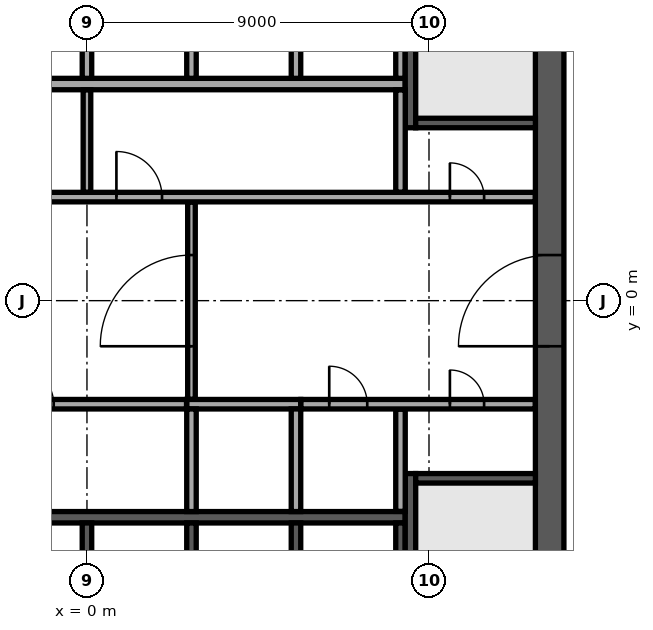
"""IFC4 building model, lengths in metres.
Left out: names, types, materials, properties, quantities, classifications, styles, units other than length and angle.
Written with IfcOpenShell. Run it as: python <this file> out.ifc"""

import sys

from ifc_helpers import new_model, si_unit, direction, frame, frame_2d, origin, place, context, subcontext, project, spatial, rectangle, extrude, element, fill, save


model = new_model("IFC4")
c1 = context("Model", 3, precision=1e-05, world=origin(), true_north=direction((0.0, 1.0)))
c2 = subcontext(c1, "Body", "Model", "MODEL_VIEW")
j1 = project(units=[si_unit("LENGTHUNIT", "METRE"), si_unit("PLANEANGLEUNIT", "RADIAN")], contexts=[c1])
p1 = place(None, origin())
s1 = spatial("IfcSite", under=j1, at=p1, CompositionType="ELEMENT")
p2 = place(p1, origin())
s2 = spatial("IfcBuilding", under=s1, at=p2, CompositionType="ELEMENT")
p3 = place(p2, frame((0.0, 0.0, 246.9)))
s3 = spatial("IfcBuildingStorey", under=s2, at=p3, CompositionType="ELEMENT", Elevation=246.9)
p4 = place(p3, frame((12.175, -11.8, 0.0), z_axis=(0.0, 0.0, 1.0), x_axis=(0.0, 1.0, 0.0)))
e1 = element("IfcWall", 1, at=p4, inside=s3, PredefinedType="SHEAR", context=c2, shape_type="SweptSolid", body=[
    extrude(rectangle(XDim=23.6, YDim=0.75, at=frame_2d((11.8, 0.0))), origin(), (0.0, 0.0, 1.0), 3.64),
])
p5 = place(p4, frame((10.6, 0.0, 0.0)))
e2 = element("IfcOpeningElement", 2, at=p5, cuts=e1, PredefinedType="OPENING", context=c2, shape_type="SweptSolid", body=[
    extrude(rectangle(XDim=2.4, YDim=2.4, at=frame_2d((1.2, 1.2))), frame((0.0, 0.385, 0.0), z_axis=(0.0, -1.0, 0.0), x_axis=(1.0, 0.0, 0.0)), (0.0, 0.0, 1.0), 0.77),
])
p6 = place(p3, frame((-8.375, 5.7, 0.0), z_axis=(0.0, 0.0, 1.0), x_axis=(1.0, 0.0, 0.0)))
e3 = element("IfcWall", 3, at=p6, inside=s3, PredefinedType="SOLIDWALL", context=c2, shape_type="SweptSolid", body=[
    extrude(rectangle(XDim=16.75, YDim=0.3, at=frame_2d((8.375, 0.0))), origin(), (0.0, 0.0, 1.0), 3.64),
])
p7 = place(p3, frame((-2.875, -5.7, 0.0), z_axis=(0.0, 0.0, 1.0), x_axis=(1.0, 0.0, 0.0)))
e4 = element("IfcWall", 4, at=p7, inside=s3, PredefinedType="SOLIDWALL", context=c2, shape_type="SweptSolid", body=[
    extrude(rectangle(XDim=11.25, YDim=0.3, at=frame_2d((5.625, 0.0))), origin(), (0.0, 0.0, 1.0), 3.64),
])
for number, where, z_axis, x_axis in (
    (5, (0.0, 5.85, 0.0), (0.0, 0.0, 1.0), (0.0, 1.0, 0.0)),
    (6, (2.75, 5.85, 0.0), (0.0, 0.0, 1.0), (0.0, 1.0, 0.0)),
    (7, (5.5, 5.85, 0.0), (0.0, 0.0, 1.0), (0.0, 1.0, 0.0)),
    (8, (8.25, 5.85, 0.0), (0.0, 0.0, 1.0), (0.0, 1.0, 0.0)),
):
    element("IfcWall", number, at=place(p3, frame(where, z_axis=z_axis, x_axis=x_axis)), inside=s3, PredefinedType="SOLIDWALL", context=c2, shape_type="SweptSolid", body=[
        extrude(rectangle(XDim=2.7, YDim=0.25, at=frame_2d((1.35, 0.0))), origin(), (0.0, 0.0, 1.0), 3.64),
    ])
p8 = place(p3, frame((2.625, -2.725, 0.0), z_axis=(0.0, 0.0, 1.0), x_axis=(1.0, 0.0, 0.0)))
e9 = element("IfcWall", 9, at=p8, inside=s3, PredefinedType="SOLIDWALL", context=c2, shape_type="SweptSolid", body=[
    extrude(rectangle(XDim=3.0, YDim=0.25, at=frame_2d((1.5, 0.0))), origin(), (0.0, 0.0, 1.0), 3.64),
])
for number, where, z_axis, x_axis in (
    (10, (2.75, -5.55, 0.0), (0.0, 0.0, 1.0), (0.0, 1.0, 0.0)),
    (11, (5.5, -5.55, 0.0), (0.0, 0.0, 1.0), (0.0, 1.0, 0.0)),
    (12, (0.0, -8.55, 0.0), (0.0, 0.0, 1.0), (0.0, 1.0, 0.0)),
    (13, (2.75, -8.55, 0.0), (0.0, 0.0, 1.0), (0.0, 1.0, 0.0)),
    (14, (5.5, -8.55, 0.0), (0.0, 0.0, 1.0), (0.0, 1.0, 0.0)),
    (15, (8.25, -8.55, 0.0), (0.0, 0.0, 1.0), (0.0, 1.0, 0.0)),
):
    element("IfcWall", number, at=place(p3, frame(where, z_axis=z_axis, x_axis=x_axis)), inside=s3, PredefinedType="SOLIDWALL", context=c2, shape_type="SweptSolid", body=[
        extrude(rectangle(XDim=2.7, YDim=0.25, at=frame_2d((1.35, 0.0))), origin(), (0.0, 0.0, 1.0), 3.64),
    ])
p9 = place(p3, frame((8.512, 4.55, 0.0), z_axis=(0.0, 0.0, 1.0), x_axis=(0.0, 1.0, 0.0)))
e16 = element("IfcWall", 16, at=p9, inside=s3, PredefinedType="SOLIDWALL", context=c2, shape_type="SweptSolid", body=[
    extrude(rectangle(XDim=7.25, YDim=0.275, at=frame_2d((3.625, 0.0))), origin(), (0.0, 0.0, 1.0), 3.64),
])
p10 = place(p9, frame((6.0, 0.0, 0.0)))
e17 = element("IfcOpeningElement", 17, at=p10, cuts=e16, PredefinedType="OPENING", context=c2, shape_type="SweptSolid", body=[
    extrude(rectangle(XDim=1.0, YDim=2.1, at=frame_2d((0.5, 1.05))), frame((0.0, 0.147, 0.0), z_axis=(0.0, -1.0, 0.0), x_axis=(1.0, 0.0, 0.0)), (0.0, 0.0, 1.0), 0.295),
])
p11 = place(p3, frame((8.65, 4.675, 0.0), z_axis=(0.0, 0.0, 1.0), x_axis=(1.0, 0.0, 0.0)))
e18 = element("IfcWall", 18, at=p11, inside=s3, PredefinedType="SOLIDWALL", context=c2, shape_type="SweptSolid", body=[
    extrude(rectangle(XDim=3.15, YDim=0.25, at=frame_2d((1.575, 0.0))), origin(), (0.0, 0.0, 1.0), 3.64),
])
p12 = place(p3, frame((8.512, -4.55, 0.0), z_axis=(0.0, 0.0, 1.0), x_axis=(0.0, -1.0, 0.0)))
e19 = element("IfcWall", 19, at=p12, inside=s3, PredefinedType="SOLIDWALL", context=c2, shape_type="SweptSolid", body=[
    extrude(rectangle(XDim=7.25, YDim=0.275, at=frame_2d((3.625, 0.0))), origin(), (0.0, 0.0, 1.0), 3.64),
])
p13 = place(p12, frame((6.0, 0.0, 0.0)))
e20 = element("IfcOpeningElement", 20, at=p13, cuts=e19, PredefinedType="OPENING", context=c2, shape_type="SweptSolid", body=[
    extrude(rectangle(XDim=1.0, YDim=2.1, at=frame_2d((0.5, 1.05))), frame((0.0, 0.147, 0.0), z_axis=(0.0, -1.0, 0.0), x_axis=(1.0, 0.0, 0.0)), (0.0, 0.0, 1.0), 0.295),
])
p14 = place(p3, frame((8.65, -4.675, 0.0), z_axis=(0.0, 0.0, 1.0), x_axis=(1.0, 0.0, 0.0)))
e21 = element("IfcWall", 21, at=p14, inside=s3, PredefinedType="SOLIDWALL", context=c2, shape_type="SweptSolid", body=[
    extrude(rectangle(XDim=3.15, YDim=0.25, at=frame_2d((1.575, 0.0))), origin(), (0.0, 0.0, 1.0), 3.64),
])
p15 = place(p3, frame((8.25, -5.545, 0.0), z_axis=(0.0, 0.0, 1.0), x_axis=(0.0, 1.0, 0.0)))
e22 = element("IfcWall", 22, at=p15, inside=s3, PredefinedType="PARTITIONING", context=c2, shape_type="SweptSolid", body=[
    extrude(rectangle(XDim=2.69, YDim=0.25, at=frame_2d((1.345, 0.0))), origin(), (0.0, 0.0, 1.0), 3.64),
])
p16 = place(p3, frame((-11.795, -2.725, 0.0), z_axis=(0.0, 0.0, 1.0), x_axis=(1.0, 0.0, 0.0)))
e23 = element("IfcWall", 23, at=p16, inside=s3, PredefinedType="PARTITIONING", context=c2, shape_type="SweptSolid", body=[
    extrude(rectangle(XDim=14.415, YDim=0.25, at=frame_2d((7.208, 0.0))), origin(), (0.0, 0.0, 1.0), 3.64),
])
p17 = place(p16, frame((1.295, 0.0, 0.0)))
e24 = element("IfcOpeningElement", 24, at=p17, cuts=e23, PredefinedType="OPENING", context=c2, shape_type="SweptSolid", body=[
    extrude(rectangle(XDim=1.0, YDim=2.1, at=frame_2d((0.5, 1.05))), frame((0.0, 0.135, 0.0), z_axis=(0.0, -1.0, 0.0), x_axis=(1.0, 0.0, 0.0)), (0.0, 0.0, 1.0), 0.27),
])
p18 = place(p16, frame((4.42, 0.0, 0.0)))
e25 = element("IfcOpeningElement", 25, at=p18, cuts=e23, PredefinedType="OPENING", context=c2, shape_type="SweptSolid", body=[
    extrude(rectangle(XDim=1.0, YDim=2.1, at=frame_2d((0.5, 1.05))), frame((0.0, 0.135, 0.0), z_axis=(0.0, -1.0, 0.0), x_axis=(1.0, 0.0, 0.0)), (0.0, 0.0, 1.0), 0.27),
])
p19 = place(p16, frame((9.92, 0.0, 0.0)))
e26 = element("IfcOpeningElement", 26, at=p19, cuts=e23, PredefinedType="OPENING", context=c2, shape_type="SweptSolid", body=[
    extrude(rectangle(XDim=1.0, YDim=2.1, at=frame_2d((0.5, 1.05))), frame((0.0, 0.135, 0.0), z_axis=(0.0, -1.0, 0.0), x_axis=(1.0, 0.0, 0.0)), (0.0, 0.0, 1.0), 0.27),
])
p20 = place(p3, frame((5.63, -2.725, 0.0), z_axis=(0.0, 0.0, 1.0), x_axis=(1.0, 0.0, 0.0)))
e27 = element("IfcWall", 27, at=p20, inside=s3, PredefinedType="PARTITIONING", context=c2, shape_type="SweptSolid", body=[
    extrude(rectangle(XDim=6.165, YDim=0.25, at=frame_2d((3.083, 0.0))), origin(), (0.0, 0.0, 1.0), 3.64),
])
p21 = place(p20, frame((0.745, 0.0, 0.0)))
e28 = element("IfcOpeningElement", 28, at=p21, cuts=e27, PredefinedType="OPENING", context=c2, shape_type="SweptSolid", body=[
    extrude(rectangle(XDim=1.0, YDim=2.1, at=frame_2d((0.5, 1.05))), frame((0.0, 0.135, 0.0), z_axis=(0.0, -1.0, 0.0), x_axis=(1.0, 0.0, 0.0)), (0.0, 0.0, 1.0), 0.27),
])
p22 = place(p20, frame((3.92, 0.0, 0.0)))
e29 = element("IfcOpeningElement", 29, at=p22, cuts=e27, PredefinedType="OPENING", context=c2, shape_type="SweptSolid", body=[
    extrude(rectangle(XDim=0.9, YDim=2.1, at=frame_2d((0.45, 1.05))), frame((0.0, 0.135, 0.0), z_axis=(0.0, -1.0, 0.0), x_axis=(1.0, 0.0, 0.0)), (0.0, 0.0, 1.0), 0.27),
])
p23 = place(p3, frame((2.75, -2.595, 0.0), z_axis=(0.0, 0.0, 1.0), x_axis=(0.0, 1.0, 0.0)))
e30 = element("IfcWall", 30, at=p23, inside=s3, PredefinedType="PARTITIONING", context=c2, shape_type="SweptSolid", body=[
    extrude(rectangle(XDim=5.19, YDim=0.2, at=frame_2d((2.595, 0.0))), origin(), (0.0, 0.0, 1.0), 3.64),
])
p24 = place(p23, frame((1.395, 0.0, 0.0)))
e31 = element("IfcOpeningElement", 31, at=p24, cuts=e30, PredefinedType="OPENING", context=c2, shape_type="SweptSolid", body=[
    extrude(rectangle(XDim=2.4, YDim=2.4, at=frame_2d((1.2, 1.2))), frame((0.0, 0.11, 0.0), z_axis=(0.0, -1.0, 0.0), x_axis=(1.0, 0.0, 0.0)), (0.0, 0.0, 1.0), 0.22),
])
p25 = place(p3, frame((-11.795, 2.725, 0.0), z_axis=(0.0, 0.0, 1.0), x_axis=(1.0, 0.0, 0.0)))
e32 = element("IfcWall", 32, at=p25, inside=s3, PredefinedType="PARTITIONING", context=c2, shape_type="SweptSolid", body=[
    extrude(rectangle(XDim=23.59, YDim=0.25, at=frame_2d((11.795, 0.0))), origin(), (0.0, 0.0, 1.0), 3.64),
])
p26 = place(p25, frame((21.345, 0.0, 0.0)))
e33 = element("IfcOpeningElement", 33, at=p26, cuts=e32, PredefinedType="OPENING", context=c2, shape_type="SweptSolid", body=[
    extrude(rectangle(XDim=0.9, YDim=2.1, at=frame_2d((0.45, 1.05))), frame((0.0, 0.135, 0.0), z_axis=(0.0, -1.0, 0.0), x_axis=(1.0, 0.0, 0.0)), (0.0, 0.0, 1.0), 0.27),
])
p27 = place(p25, frame((1.345, 0.0, 0.0)))
e34 = element("IfcOpeningElement", 34, at=p27, cuts=e32, PredefinedType="OPENING", context=c2, shape_type="SweptSolid", body=[
    extrude(rectangle(XDim=0.9, YDim=2.1, at=frame_2d((0.45, 1.05))), frame((0.0, 0.135, 0.0), z_axis=(0.0, -1.0, 0.0), x_axis=(1.0, 0.0, 0.0)), (0.0, 0.0, 1.0), 0.27),
])
p28 = place(p25, frame((4.42, 0.0, 0.0)))
e35 = element("IfcOpeningElement", 35, at=p28, cuts=e32, PredefinedType="OPENING", context=c2, shape_type="SweptSolid", body=[
    extrude(rectangle(XDim=1.0, YDim=2.1, at=frame_2d((0.5, 1.05))), frame((0.0, 0.135, 0.0), z_axis=(0.0, -1.0, 0.0), x_axis=(1.0, 0.0, 0.0)), (0.0, 0.0, 1.0), 0.27),
])
p29 = place(p25, frame((7.17, 0.0, 0.0)))
e36 = element("IfcOpeningElement", 36, at=p29, cuts=e32, PredefinedType="OPENING", context=c2, shape_type="SweptSolid", body=[
    extrude(rectangle(XDim=1.0, YDim=2.1, at=frame_2d((0.5, 1.05))), frame((0.0, 0.135, 0.0), z_axis=(0.0, -1.0, 0.0), x_axis=(1.0, 0.0, 0.0)), (0.0, 0.0, 1.0), 0.27),
])
p30 = place(p25, frame((12.57, 0.0, 0.0)))
e37 = element("IfcOpeningElement", 37, at=p30, cuts=e32, PredefinedType="OPENING", context=c2, shape_type="SweptSolid", body=[
    extrude(rectangle(XDim=1.2, YDim=2.1, at=frame_2d((0.6, 1.05))), frame((0.0, 0.135, 0.0), z_axis=(0.0, -1.0, 0.0), x_axis=(1.0, 0.0, 0.0)), (0.0, 0.0, 1.0), 0.27),
])
p31 = place(p3, frame((0.0, 2.855, 0.0), z_axis=(0.0, 0.0, 1.0), x_axis=(0.0, 1.0, 0.0)))
e38 = element("IfcWall", 38, at=p31, inside=s3, PredefinedType="PARTITIONING", context=c2, shape_type="SweptSolid", body=[
    extrude(rectangle(XDim=2.69, YDim=0.2, at=frame_2d((1.345, 0.0))), origin(), (0.0, 0.0, 1.0), 3.64),
])
p32 = place(p3, frame((8.25, 2.855, 0.0), z_axis=(0.0, 0.0, 1.0), x_axis=(0.0, 1.0, 0.0)))
e39 = element("IfcWall", 39, at=p32, inside=s3, PredefinedType="PARTITIONING", context=c2, shape_type="SweptSolid", body=[
    extrude(rectangle(XDim=2.69, YDim=0.25, at=frame_2d((1.345, 0.0))), origin(), (0.0, 0.0, 1.0), 3.64),
])
p33 = place(p3, frame((5.206, -33.362, 0.0), z_axis=(0.0, 0.0, 1.0), x_axis=(0.573577438409, 0.81915134264, 0.0)))
e40 = element("IfcWall", 40, at=p33, inside=s3, PredefinedType="STANDARD", context=c2, shape_type="SweptSolid", body=[
    extrude(rectangle(XDim=48.686, YDim=0.6, at=frame_2d((24.343, 0.0))), origin(), (0.0, 0.0, 1.0), 3.64),
])
p34 = place(p33, frame((1.213, 0.0, 0.9)))
e41 = element("IfcOpeningElement", 41, at=p34, cuts=e40, PredefinedType="OPENING", context=c2, shape_type="SweptSolid", body=[
    extrude(rectangle(XDim=2.0, YDim=2.1, at=frame_2d((1.0, 1.05))), frame((0.0, 0.31, 0.0), z_axis=(0.0, -1.0, 0.0), x_axis=(1.0, 0.0, 0.0)), (0.0, 0.0, 1.0), 0.62),
])
p35 = place(p33, frame((5.639, 0.0, 0.9)))
e42 = element("IfcOpeningElement", 42, at=p35, cuts=e40, PredefinedType="OPENING", context=c2, shape_type="SweptSolid", body=[
    extrude(rectangle(XDim=2.0, YDim=2.1, at=frame_2d((1.0, 1.05))), frame((0.0, 0.31, 0.0), z_axis=(0.0, -1.0, 0.0), x_axis=(1.0, 0.0, 0.0)), (0.0, 0.0, 1.0), 0.62),
])
p36 = place(p33, frame((10.065, 0.0, 0.9)))
e43 = element("IfcOpeningElement", 43, at=p36, cuts=e40, PredefinedType="OPENING", context=c2, shape_type="SweptSolid", body=[
    extrude(rectangle(XDim=2.0, YDim=2.1, at=frame_2d((1.0, 1.05))), frame((0.0, 0.31, 0.0), z_axis=(0.0, -1.0, 0.0), x_axis=(1.0, 0.0, 0.0)), (0.0, 0.0, 1.0), 0.62),
])
p37 = place(p33, frame((14.491, 0.0, 0.9)))
e44 = element("IfcOpeningElement", 44, at=p37, cuts=e40, PredefinedType="OPENING", context=c2, shape_type="SweptSolid", body=[
    extrude(rectangle(XDim=2.0, YDim=2.1, at=frame_2d((1.0, 1.05))), frame((0.0, 0.31, 0.0), z_axis=(0.0, -1.0, 0.0), x_axis=(1.0, 0.0, 0.0)), (0.0, 0.0, 1.0), 0.62),
])
p38 = place(p33, frame((18.917, 0.0, 0.9)))
e45 = element("IfcOpeningElement", 45, at=p38, cuts=e40, PredefinedType="OPENING", context=c2, shape_type="SweptSolid", body=[
    extrude(rectangle(XDim=2.0, YDim=2.1, at=frame_2d((1.0, 1.05))), frame((0.0, 0.31, 0.0), z_axis=(0.0, -1.0, 0.0), x_axis=(1.0, 0.0, 0.0)), (0.0, 0.0, 1.0), 0.62),
])
p39 = place(p33, frame((23.343, 0.0, 0.9)))
e46 = element("IfcOpeningElement", 46, at=p39, cuts=e40, PredefinedType="OPENING", context=c2, shape_type="SweptSolid", body=[
    extrude(rectangle(XDim=2.0, YDim=2.1, at=frame_2d((1.0, 1.05))), frame((0.0, 0.31, 0.0), z_axis=(0.0, -1.0, 0.0), x_axis=(1.0, 0.0, 0.0)), (0.0, 0.0, 1.0), 0.62),
])
p40 = place(p33, frame((27.769, 0.0, 0.9)))
e47 = element("IfcOpeningElement", 47, at=p40, cuts=e40, PredefinedType="OPENING", context=c2, shape_type="SweptSolid", body=[
    extrude(rectangle(XDim=2.0, YDim=2.1, at=frame_2d((1.0, 1.05))), frame((0.0, 0.31, 0.0), z_axis=(0.0, -1.0, 0.0), x_axis=(1.0, 0.0, 0.0)), (0.0, 0.0, 1.0), 0.62),
])
p41 = place(p33, frame((32.195, 0.0, 0.9)))
e48 = element("IfcOpeningElement", 48, at=p41, cuts=e40, PredefinedType="OPENING", context=c2, shape_type="SweptSolid", body=[
    extrude(rectangle(XDim=2.0, YDim=2.1, at=frame_2d((1.0, 1.05))), frame((0.0, 0.31, 0.0), z_axis=(0.0, -1.0, 0.0), x_axis=(1.0, 0.0, 0.0)), (0.0, 0.0, 1.0), 0.62),
])
p42 = place(p33, frame((36.621, 0.0, 0.9)))
e49 = element("IfcOpeningElement", 49, at=p42, cuts=e40, PredefinedType="OPENING", context=c2, shape_type="SweptSolid", body=[
    extrude(rectangle(XDim=2.0, YDim=2.1, at=frame_2d((1.0, 1.05))), frame((0.0, 0.31, 0.0), z_axis=(0.0, -1.0, 0.0), x_axis=(1.0, 0.0, 0.0)), (0.0, 0.0, 1.0), 0.62),
])
p43 = place(p33, frame((41.047, 0.0, 0.9)))
e50 = element("IfcOpeningElement", 50, at=p43, cuts=e40, PredefinedType="OPENING", context=c2, shape_type="SweptSolid", body=[
    extrude(rectangle(XDim=2.0, YDim=2.1, at=frame_2d((1.0, 1.05))), frame((0.0, 0.31, 0.0), z_axis=(0.0, -1.0, 0.0), x_axis=(1.0, 0.0, 0.0)), (0.0, 0.0, 1.0), 0.62),
])
p44 = place(p33, frame((45.473, 0.0, 0.9)))
e51 = element("IfcOpeningElement", 51, at=p44, cuts=e40, PredefinedType="OPENING", context=c2, shape_type="SweptSolid", body=[
    extrude(rectangle(XDim=2.0, YDim=2.1, at=frame_2d((1.0, 1.05))), frame((0.0, 0.31, 0.0), z_axis=(0.0, -1.0, 0.0), x_axis=(1.0, 0.0, 0.0)), (0.0, 0.0, 1.0), 0.62),
])
p45 = place(p5, origin())
e52 = element("IfcDoor", 52, at=p45, inside=s3, OperationType="SINGLE_SWING_LEFT", PredefinedType="DOOR", context=c2, shape_type="SweptSolid", body=[
    extrude(rectangle(XDim=2.4, YDim=2.4, at=frame_2d((1.2, 1.2))), frame((0.0, 0.025, 0.0), z_axis=(0.0, -1.0, 0.0), x_axis=(1.0, 0.0, 0.0)), (0.0, 0.0, 1.0), 0.05),
])
fill(e2, e52)
p46 = place(p21, origin())
e53 = element("IfcDoor", 53, at=p46, inside=s3, OperationType="SINGLE_SWING_LEFT", PredefinedType="DOOR", context=c2, shape_type="SweptSolid", body=[
    extrude(rectangle(XDim=1.0, YDim=2.1, at=frame_2d((0.5, 1.05))), frame((0.0, 0.025, 0.0), z_axis=(0.0, -1.0, 0.0), x_axis=(1.0, 0.0, 0.0)), (0.0, 0.0, 1.0), 0.05),
])
fill(e28, e53)
p47 = place(p26, origin())
e54 = element("IfcDoor", 54, at=p47, inside=s3, OperationType="SINGLE_SWING_LEFT", PredefinedType="DOOR", context=c2, shape_type="SweptSolid", body=[
    extrude(rectangle(XDim=0.9, YDim=2.1, at=frame_2d((0.45, 1.05))), frame((0.0, 0.025, 0.0), z_axis=(0.0, -1.0, 0.0), x_axis=(1.0, 0.0, 0.0)), (0.0, 0.0, 1.0), 0.05),
])
fill(e33, e54)
p48 = place(p22, origin())
e55 = element("IfcDoor", 55, at=p48, inside=s3, OperationType="SINGLE_SWING_LEFT", PredefinedType="DOOR", context=c2, shape_type="SweptSolid", body=[
    extrude(rectangle(XDim=0.9, YDim=2.1, at=frame_2d((0.45, 1.05))), frame((0.0, 0.025, 0.0), z_axis=(0.0, -1.0, 0.0), x_axis=(1.0, 0.0, 0.0)), (0.0, 0.0, 1.0), 0.05),
])
fill(e29, e55)
p49 = place(p30, origin())
e56 = element("IfcDoor", 56, at=p49, inside=s3, OperationType="SINGLE_SWING_LEFT", PredefinedType="DOOR", context=c2, shape_type="SweptSolid", body=[
    extrude(rectangle(XDim=1.2, YDim=2.1, at=frame_2d((0.6, 1.05))), frame((0.0, 0.025, 0.0), z_axis=(0.0, -1.0, 0.0), x_axis=(1.0, 0.0, 0.0)), (0.0, 0.0, 1.0), 0.05),
])
fill(e37, e56)
p50 = place(p19, origin())
e57 = element("IfcDoor", 57, at=p50, inside=s3, OperationType="SINGLE_SWING_LEFT", PredefinedType="DOOR", context=c2, shape_type="SweptSolid", body=[
    extrude(rectangle(XDim=1.0, YDim=2.1, at=frame_2d((0.5, 1.05))), frame((0.0, 0.025, 0.0), z_axis=(0.0, -1.0, 0.0), x_axis=(1.0, 0.0, 0.0)), (0.0, 0.0, 1.0), 0.05),
])
fill(e26, e57)
p51 = place(p24, origin())
e58 = element("IfcDoor", 58, at=p51, inside=s3, OperationType="SINGLE_SWING_LEFT", PredefinedType="DOOR", context=c2, shape_type="SweptSolid", body=[
    extrude(rectangle(XDim=2.4, YDim=2.4, at=frame_2d((1.2, 1.2))), frame((0.0, 0.025, 0.0), z_axis=(0.0, -1.0, 0.0), x_axis=(1.0, 0.0, 0.0)), (0.0, 0.0, 1.0), 0.05),
])
fill(e31, e58)
save(model, sys.argv[1])
